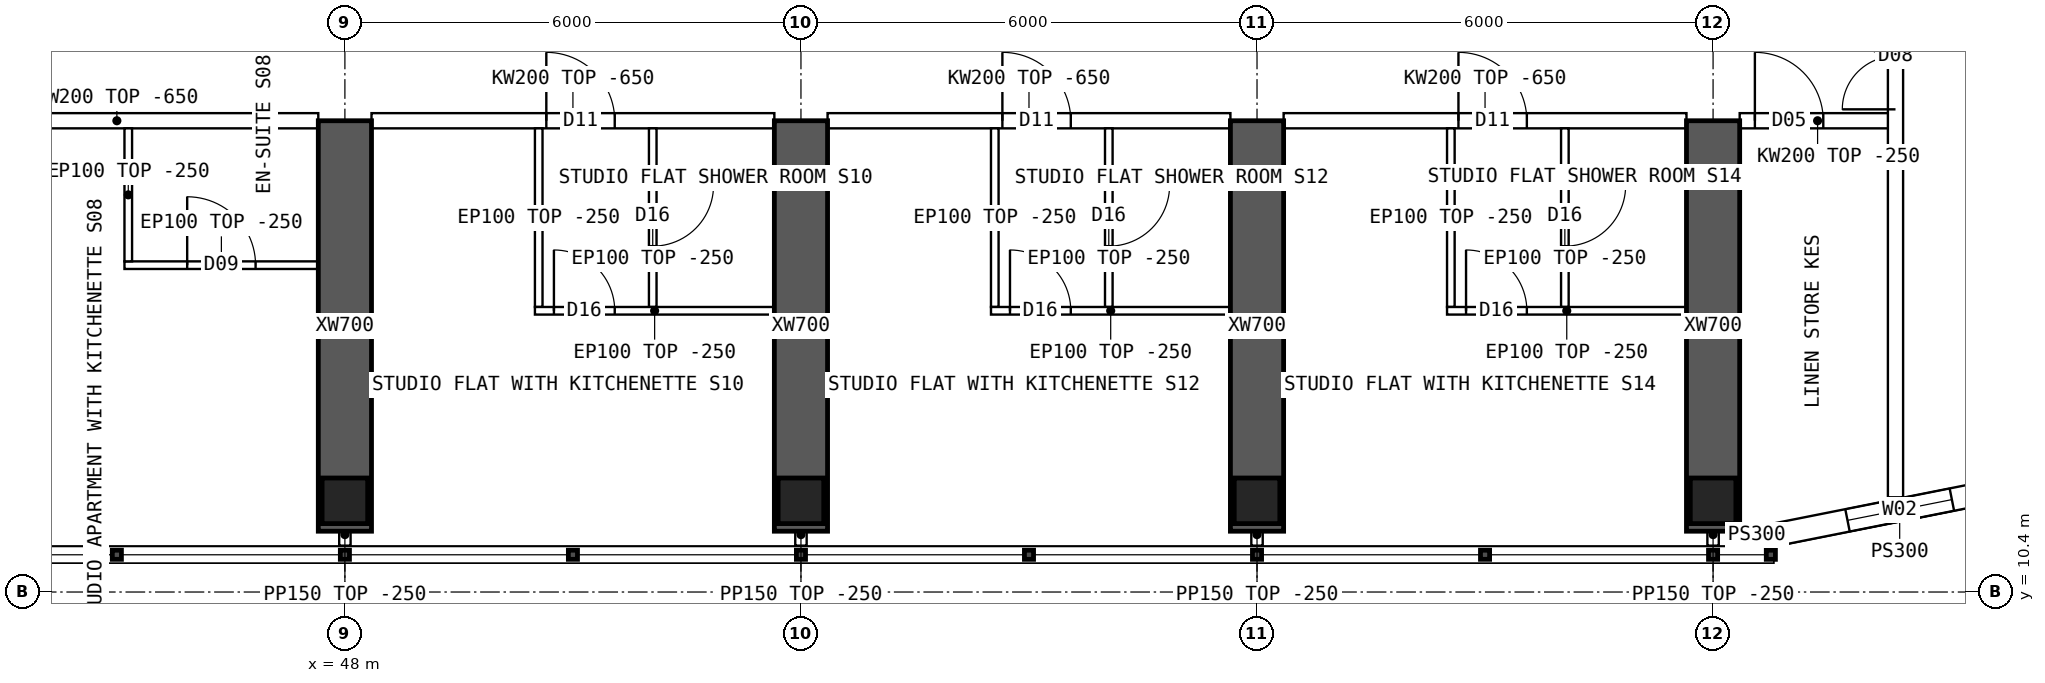
"""IFC4 building model, lengths in metres.
Left out: names, types, materials, properties, quantities, classifications, styles, units other than length and angle.
Written with IfcOpenShell. Run it as: python <this file> out.ifc"""

import sys

from ifc_helpers import new_model, si_unit, direction, frame, frame_2d, origin, origin_2d, place, context, subcontext, project, spatial, polyline, rectangle, hollow_rectangle, outline, extrude, element, fill, save


model = new_model("IFC4")
c1 = context("Model", 3, precision=1e-05, world=origin(), true_north=direction((0.0, 1.0)))
c2 = subcontext(c1, "Body", "Model", "MODEL_VIEW")
j1 = project(units=[si_unit("LENGTHUNIT", "METRE"), si_unit("PLANEANGLEUNIT", "RADIAN")], contexts=[c1])
p1 = place(None, origin())
s1 = spatial("IfcSite", under=j1, at=p1, CompositionType="ELEMENT")
p2 = place(p1, origin())
s2 = spatial("IfcBuilding", under=s1, at=p2, CompositionType="ELEMENT")
p3 = place(p2, frame((0.0, 0.0, 250.3)))
s3 = spatial("IfcBuildingStorey", under=s2, at=p3, CompositionType="ELEMENT", Elevation=250.3)
for number, where, z_axis, x_axis in (
    (1, (48.0, 11.6, 0.0), (0.0, 0.0, 1.0), (1.0, 0.0, 0.0)),
    (2, (54.0, 11.6, 0.0), (0.0, 0.0, 1.0), (1.0, 0.0, 0.0)),
    (3, (60.0, 11.6, 0.0), (0.0, 0.0, 1.0), (1.0, 0.0, 0.0)),
    (4, (66.0, 11.6, 0.0), (0.0, 0.0, 1.0), (1.0, 0.0, 0.0)),
):
    element("IfcColumn", number, at=place(p3, frame(where, z_axis=z_axis, x_axis=x_axis)), inside=s3, PredefinedType="COLUMN", context=c2, shape_type="SweptSolid", body=[
        extrude(hollow_rectangle(XDim=0.6, YDim=0.6, WallThickness=0.06, at=origin_2d()), origin(), (0.0, 0.0, 1.0), 3.75),
    ])
for number, where, z_axis, x_axis in (
    (5, (48.0, 11.2, 0.0), (0.0, 0.0, 1.0), (0.0, 1.0, 0.0)),
    (6, (54.0, 11.2, 0.0), (0.0, 0.0, 1.0), (0.0, 1.0, 0.0)),
    (7, (60.0, 11.2, 0.0), (0.0, 0.0, 1.0), (0.0, 1.0, 0.0)),
    (8, (66.0, 11.2, 0.0), (0.0, 0.0, 1.0), (0.0, 1.0, 0.0)),
):
    element("IfcWall", number, at=place(p3, frame(where, z_axis=z_axis, x_axis=x_axis)), inside=s3, PredefinedType="SHEAR", context=c2, shape_type="SweptSolid", body=[
        extrude(rectangle(XDim=5.4, YDim=0.7, at=frame_2d((2.7, 0.0))), origin(), (0.0, 0.0, 1.0), 3.75),
    ])
p4 = place(p3, frame((66.8, 11.15, 0.0), z_axis=(0.0, 0.0, 1.0), x_axis=(0.98078325777, 0.195100490205, 0.0)))
e9 = element("IfcWall", 9, at=p4, inside=s3, PredefinedType="SOLIDWALL", context=c2, shape_type="SweptSolid", body=[
    extrude(outline(polyline([(-0.03, -0.15), (3.405, -0.15), (3.345, 0.15), (0.03, 0.15), (-0.03, -0.15)])), origin(), (0.0, 0.0, 1.0), 3.5),
])
p5 = place(p4, frame((0.988, 0.0, 0.9)))
e10 = element("IfcOpeningElement", 10, at=p5, cuts=e9, PredefinedType="OPENING", context=c2, shape_type="SweptSolid", body=[
    extrude(rectangle(XDim=1.4, YDim=1.8, at=frame_2d((0.7, 0.9))), frame((0.0, 0.16, 0.0), z_axis=(0.0, -1.0, 0.0), x_axis=(1.0, 0.0, 0.0)), (0.0, 0.0, 1.0), 0.32),
])
p6 = place(p3, frame((66.8, 11.15, 0.0), z_axis=(0.0, 0.0, 1.0), x_axis=(-1.0, 0.0, 0.0)))
e11 = element("IfcWall", 11, at=p6, inside=s3, PredefinedType="SOLIDWALL", context=c2, shape_type="SweptSolid", body=[
    extrude(rectangle(XDim=0.45, YDim=0.3, at=frame_2d((0.225, 0.0))), origin(), (0.0, 0.0, 1.0), 3.5),
])
p7 = place(p3, frame((42.35, 16.6, 0.0), z_axis=(0.0, 0.0, 1.0), x_axis=(1.0, 0.0, 0.0)))
e12 = element("IfcWall", 12, at=p7, inside=s3, PredefinedType="SOLIDWALL", context=c2, shape_type="SweptSolid", body=[
    extrude(outline(polyline([(0.0, 0.0), (5.3, 0.0), (5.3, 3.1), (0.0, 3.1), (0.0, 0.0)])), frame((0.0, 0.1, 0.0), z_axis=(0.0, -1.0, 0.0), x_axis=(1.0, 0.0, 0.0)), (0.0, 0.0, 1.0), 0.2),
])
p8 = place(p7, frame((0.1, 0.0, 0.0)))
e13 = element("IfcOpeningElement", 13, at=p8, cuts=e12, PredefinedType="OPENING", context=c2, shape_type="SweptSolid", body=[
    extrude(rectangle(XDim=0.9, YDim=2.1, at=frame_2d((0.45, 1.05))), frame((0.0, 0.11, 0.0), z_axis=(0.0, -1.0, 0.0), x_axis=(1.0, 0.0, 0.0)), (0.0, 0.0, 1.0), 0.22),
])
p9 = place(p3, frame((48.35, 16.6, 0.0), z_axis=(0.0, 0.0, 1.0), x_axis=(1.0, 0.0, 0.0)))
e14 = element("IfcWall", 14, at=p9, inside=s3, PredefinedType="SOLIDWALL", context=c2, shape_type="SweptSolid", body=[
    extrude(outline(polyline([(0.0, 0.0), (5.3, 0.0), (5.3, 3.1), (0.0, 3.1), (0.0, 0.0)])), frame((0.0, 0.1, 0.0), z_axis=(0.0, -1.0, 0.0), x_axis=(1.0, 0.0, 0.0)), (0.0, 0.0, 1.0), 0.2),
])
p10 = place(p9, frame((2.3, 0.0, 0.0)))
e15 = element("IfcOpeningElement", 15, at=p10, cuts=e14, PredefinedType="OPENING", context=c2, shape_type="SweptSolid", body=[
    extrude(rectangle(XDim=0.9, YDim=2.1, at=frame_2d((0.45, 1.05))), frame((0.0, 0.11, 0.0), z_axis=(0.0, -1.0, 0.0), x_axis=(1.0, 0.0, 0.0)), (0.0, 0.0, 1.0), 0.22),
])
p11 = place(p3, frame((54.35, 16.6, 0.0), z_axis=(0.0, 0.0, 1.0), x_axis=(1.0, 0.0, 0.0)))
e16 = element("IfcWall", 16, at=p11, inside=s3, PredefinedType="SOLIDWALL", context=c2, shape_type="SweptSolid", body=[
    extrude(outline(polyline([(0.0, 0.0), (5.3, 0.0), (5.3, 3.1), (0.0, 3.1), (0.0, 0.0)])), frame((0.0, 0.1, 0.0), z_axis=(0.0, -1.0, 0.0), x_axis=(1.0, 0.0, 0.0)), (0.0, 0.0, 1.0), 0.2),
])
p12 = place(p11, frame((2.3, 0.0, 0.0)))
e17 = element("IfcOpeningElement", 17, at=p12, cuts=e16, PredefinedType="OPENING", context=c2, shape_type="SweptSolid", body=[
    extrude(rectangle(XDim=0.9, YDim=2.1, at=frame_2d((0.45, 1.05))), frame((0.0, 0.11, 0.0), z_axis=(0.0, -1.0, 0.0), x_axis=(1.0, 0.0, 0.0)), (0.0, 0.0, 1.0), 0.22),
])
p13 = place(p3, frame((60.35, 16.6, 0.0), z_axis=(0.0, 0.0, 1.0), x_axis=(1.0, 0.0, 0.0)))
e18 = element("IfcWall", 18, at=p13, inside=s3, PredefinedType="SOLIDWALL", context=c2, shape_type="SweptSolid", body=[
    extrude(outline(polyline([(0.0, 0.0), (5.3, 0.0), (5.3, 3.1), (0.0, 3.1), (0.0, 0.0)])), frame((0.0, 0.1, 0.0), z_axis=(0.0, -1.0, 0.0), x_axis=(1.0, 0.0, 0.0)), (0.0, 0.0, 1.0), 0.2),
])
p14 = place(p13, frame((2.3, 0.0, 0.0)))
e19 = element("IfcOpeningElement", 19, at=p14, cuts=e18, PredefinedType="OPENING", context=c2, shape_type="SweptSolid", body=[
    extrude(rectangle(XDim=0.9, YDim=2.1, at=frame_2d((0.45, 1.05))), frame((0.0, 0.11, 0.0), z_axis=(0.0, -1.0, 0.0), x_axis=(1.0, 0.0, 0.0)), (0.0, 0.0, 1.0), 0.22),
])
p15 = place(p3, frame((66.35, 16.6, 0.0), z_axis=(0.0, 0.0, 1.0), x_axis=(1.0, 0.0, 0.0)))
e20 = element("IfcWall", 20, at=p15, inside=s3, PredefinedType="SOLIDWALL", context=c2, shape_type="SweptSolid", body=[
    extrude(rectangle(XDim=2.05, YDim=0.2, at=frame_2d((1.025, 0.0))), origin(), (0.0, 0.0, 1.0), 3.5),
])
p16 = place(p15, frame((0.2, 0.0, 0.0)))
e21 = element("IfcOpeningElement", 21, at=p16, cuts=e20, PredefinedType="OPENING", context=c2, shape_type="SweptSolid", body=[
    extrude(rectangle(XDim=0.9, YDim=2.1, at=frame_2d((0.45, 1.05))), frame((0.0, 0.11, 0.0), z_axis=(0.0, -1.0, 0.0), x_axis=(1.0, 0.0, 0.0)), (0.0, 0.0, 1.0), 0.22),
])
p17 = place(p3, frame((47.65, 14.7, 0.0), z_axis=(0.0, 0.0, 1.0), x_axis=(-1.0, 0.0, 0.0)))
e22 = element("IfcWall", 22, at=p17, inside=s3, PredefinedType="PARTITIONING", context=c2, shape_type="SweptSolid", body=[
    extrude(rectangle(XDim=2.55, YDim=0.1, at=frame_2d((1.275, 0.0))), origin(), (0.0, 0.0, 1.0), 3.5),
])
p18 = place(p17, frame((0.825, 0.0, 0.0)))
e23 = element("IfcOpeningElement", 23, at=p18, cuts=e22, PredefinedType="OPENING", context=c2, shape_type="SweptSolid", body=[
    extrude(rectangle(XDim=0.9, YDim=2.1, at=frame_2d((0.45, 1.05))), frame((0.0, 0.06, 0.0), z_axis=(0.0, -1.0, 0.0), x_axis=(1.0, 0.0, 0.0)), (0.0, 0.0, 1.0), 0.12),
])
p19 = place(p3, frame((45.15, 14.75, 0.0), z_axis=(0.0, 0.0, 1.0), x_axis=(0.0, 1.0, 0.0)))
e24 = element("IfcWall", 24, at=p19, inside=s3, PredefinedType="PARTITIONING", context=c2, shape_type="SweptSolid", body=[
    extrude(outline(polyline([(0.0, 0.0), (1.75, 0.0), (1.75, 3.1), (1.702, 3.1), (1.7, 3.5), (0.0, 3.5), (0.0, 0.0)])), frame((0.0, 0.05, 0.0), z_axis=(0.0, -1.0, 0.0), x_axis=(1.0, 0.0, 0.0)), (0.0, 0.0, 1.0), 0.1),
])
p20 = place(p3, frame((53.65, 14.1, 0.0), z_axis=(0.0, 0.0, 1.0), x_axis=(-1.0, 0.0, 0.0)))
e25 = element("IfcWall", 25, at=p20, inside=s3, PredefinedType="PARTITIONING", context=c2, shape_type="SweptSolid", body=[
    extrude(rectangle(XDim=3.15, YDim=0.1, at=frame_2d((1.575, 0.0))), origin(), (0.0, 0.0, 1.0), 3.5),
])
p21 = place(p20, frame((2.1, 0.0, 0.0)))
e26 = element("IfcOpeningElement", 26, at=p21, cuts=e25, PredefinedType="OPENING", context=c2, shape_type="SweptSolid", body=[
    extrude(rectangle(XDim=0.8, YDim=2.1, at=frame_2d((0.4, 1.05))), frame((0.0, 0.06, 0.0), z_axis=(0.0, -1.0, 0.0), x_axis=(1.0, 0.0, 0.0)), (0.0, 0.0, 1.0), 0.12),
])
p22 = place(p3, frame((50.55, 14.15, 0.0), z_axis=(0.0, 0.0, 1.0), x_axis=(0.0, 1.0, 0.0)))
e27 = element("IfcWall", 27, at=p22, inside=s3, PredefinedType="PARTITIONING", context=c2, shape_type="SweptSolid", body=[
    extrude(outline(polyline([(0.0, 0.0), (2.35, 0.0), (2.35, 3.1), (2.302, 3.1), (2.3, 3.5), (0.0, 3.5), (0.0, 0.0)])), frame((0.0, 0.05, 0.0), z_axis=(0.0, -1.0, 0.0), x_axis=(1.0, 0.0, 0.0)), (0.0, 0.0, 1.0), 0.1),
])
p23 = place(p3, frame((52.05, 14.15, 0.0), z_axis=(0.0, 0.0, 1.0), x_axis=(0.0, 1.0, 0.0)))
e28 = element("IfcWall", 28, at=p23, inside=s3, PredefinedType="PARTITIONING", context=c2, shape_type="SweptSolid", body=[
    extrude(outline(polyline([(0.0, 0.0), (2.35, 0.0), (2.35, 3.1), (2.302, 3.1), (2.3, 3.5), (0.0, 3.5), (0.0, 0.0)])), frame((0.0, 0.05, 0.0), z_axis=(0.0, -1.0, 0.0), x_axis=(1.0, 0.0, 0.0)), (0.0, 0.0, 1.0), 0.1),
])
p24 = place(p23, frame((0.8, 0.0, 0.0)))
e29 = element("IfcOpeningElement", 29, at=p24, cuts=e28, PredefinedType="OPENING", context=c2, shape_type="SweptSolid", body=[
    extrude(rectangle(XDim=0.8, YDim=2.1, at=frame_2d((0.4, 1.05))), frame((0.0, 0.06, 0.0), z_axis=(0.0, -1.0, 0.0), x_axis=(1.0, 0.0, 0.0)), (0.0, 0.0, 1.0), 0.12),
])
p25 = place(p3, frame((59.65, 14.1, 0.0), z_axis=(0.0, 0.0, 1.0), x_axis=(-1.0, 0.0, 0.0)))
e30 = element("IfcWall", 30, at=p25, inside=s3, PredefinedType="PARTITIONING", context=c2, shape_type="SweptSolid", body=[
    extrude(rectangle(XDim=3.15, YDim=0.1, at=frame_2d((1.575, 0.0))), origin(), (0.0, 0.0, 1.0), 3.5),
])
p26 = place(p25, frame((2.1, 0.0, 0.0)))
e31 = element("IfcOpeningElement", 31, at=p26, cuts=e30, PredefinedType="OPENING", context=c2, shape_type="SweptSolid", body=[
    extrude(rectangle(XDim=0.8, YDim=2.1, at=frame_2d((0.4, 1.05))), frame((0.0, 0.06, 0.0), z_axis=(0.0, -1.0, 0.0), x_axis=(1.0, 0.0, 0.0)), (0.0, 0.0, 1.0), 0.12),
])
p27 = place(p3, frame((56.55, 14.15, 0.0), z_axis=(0.0, 0.0, 1.0), x_axis=(0.0, 1.0, 0.0)))
e32 = element("IfcWall", 32, at=p27, inside=s3, PredefinedType="PARTITIONING", context=c2, shape_type="SweptSolid", body=[
    extrude(outline(polyline([(0.0, 0.0), (2.35, 0.0), (2.35, 3.1), (2.302, 3.1), (2.3, 3.5), (0.0, 3.5), (0.0, 0.0)])), frame((0.0, 0.05, 0.0), z_axis=(0.0, -1.0, 0.0), x_axis=(1.0, 0.0, 0.0)), (0.0, 0.0, 1.0), 0.1),
])
p28 = place(p3, frame((58.05, 14.15, 0.0), z_axis=(0.0, 0.0, 1.0), x_axis=(0.0, 1.0, 0.0)))
e33 = element("IfcWall", 33, at=p28, inside=s3, PredefinedType="PARTITIONING", context=c2, shape_type="SweptSolid", body=[
    extrude(outline(polyline([(0.0, 0.0), (2.35, 0.0), (2.35, 3.1), (2.302, 3.1), (2.3, 3.5), (0.0, 3.5), (0.0, 0.0)])), frame((0.0, 0.05, 0.0), z_axis=(0.0, -1.0, 0.0), x_axis=(1.0, 0.0, 0.0)), (0.0, 0.0, 1.0), 0.1),
])
p29 = place(p28, frame((0.8, 0.0, 0.0)))
e34 = element("IfcOpeningElement", 34, at=p29, cuts=e33, PredefinedType="OPENING", context=c2, shape_type="SweptSolid", body=[
    extrude(rectangle(XDim=0.8, YDim=2.1, at=frame_2d((0.4, 1.05))), frame((0.0, 0.06, 0.0), z_axis=(0.0, -1.0, 0.0), x_axis=(1.0, 0.0, 0.0)), (0.0, 0.0, 1.0), 0.12),
])
p30 = place(p3, frame((65.65, 14.1, 0.0), z_axis=(0.0, 0.0, 1.0), x_axis=(-1.0, 0.0, 0.0)))
e35 = element("IfcWall", 35, at=p30, inside=s3, PredefinedType="PARTITIONING", context=c2, shape_type="SweptSolid", body=[
    extrude(rectangle(XDim=3.15, YDim=0.1, at=frame_2d((1.575, 0.0))), origin(), (0.0, 0.0, 1.0), 3.5),
])
p31 = place(p30, frame((2.1, 0.0, 0.0)))
e36 = element("IfcOpeningElement", 36, at=p31, cuts=e35, PredefinedType="OPENING", context=c2, shape_type="SweptSolid", body=[
    extrude(rectangle(XDim=0.8, YDim=2.1, at=frame_2d((0.4, 1.05))), frame((0.0, 0.06, 0.0), z_axis=(0.0, -1.0, 0.0), x_axis=(1.0, 0.0, 0.0)), (0.0, 0.0, 1.0), 0.12),
])
p32 = place(p3, frame((62.55, 14.15, 0.0), z_axis=(0.0, 0.0, 1.0), x_axis=(0.0, 1.0, 0.0)))
e37 = element("IfcWall", 37, at=p32, inside=s3, PredefinedType="PARTITIONING", context=c2, shape_type="SweptSolid", body=[
    extrude(outline(polyline([(0.0, 0.0), (2.35, 0.0), (2.35, 3.1), (2.302, 3.1), (2.3, 3.5), (0.0, 3.5), (0.0, 0.0)])), frame((0.0, 0.05, 0.0), z_axis=(0.0, -1.0, 0.0), x_axis=(1.0, 0.0, 0.0)), (0.0, 0.0, 1.0), 0.1),
])
p33 = place(p3, frame((64.05, 14.15, 0.0), z_axis=(0.0, 0.0, 1.0), x_axis=(0.0, 1.0, 0.0)))
e38 = element("IfcWall", 38, at=p33, inside=s3, PredefinedType="PARTITIONING", context=c2, shape_type="SweptSolid", body=[
    extrude(outline(polyline([(0.0, 0.0), (2.35, 0.0), (2.35, 3.1), (2.302, 3.1), (2.3, 3.5), (0.0, 3.5), (0.0, 0.0)])), frame((0.0, 0.05, 0.0), z_axis=(0.0, -1.0, 0.0), x_axis=(1.0, 0.0, 0.0)), (0.0, 0.0, 1.0), 0.1),
])
p34 = place(p33, frame((0.8, 0.0, 0.0)))
e39 = element("IfcOpeningElement", 39, at=p34, cuts=e38, PredefinedType="OPENING", context=c2, shape_type="SweptSolid", body=[
    extrude(rectangle(XDim=0.8, YDim=2.1, at=frame_2d((0.4, 1.05))), frame((0.0, 0.06, 0.0), z_axis=(0.0, -1.0, 0.0), x_axis=(1.0, 0.0, 0.0)), (0.0, 0.0, 1.0), 0.12),
])
p35 = place(p3, frame((68.4, 11.646, 0.0), z_axis=(0.0, 0.0, 1.0), x_axis=(0.0, 1.0, 0.0)))
e40 = element("IfcWall", 40, at=p35, inside=s3, PredefinedType="SOLIDWALL", context=c2, shape_type="SweptSolid", body=[
    extrude(rectangle(XDim=40.708, YDim=0.2, at=frame_2d((20.354, 0.0))), origin(), (0.0, 0.0, 1.0), 3.5),
])
p36 = place(p35, frame((5.104, 0.0, 0.0)))
e41 = element("IfcOpeningElement", 41, at=p36, cuts=e40, PredefinedType="OPENING", context=c2, shape_type="SweptSolid", body=[
    extrude(rectangle(XDim=1.4, YDim=2.1, at=frame_2d((0.7, 1.05))), frame((0.0, 0.11, 0.0), z_axis=(0.0, -1.0, 0.0), x_axis=(1.0, 0.0, 0.0)), (0.0, 0.0, 1.0), 0.22),
])
p37 = place(p35, frame((34.104, 0.0, 0.0)))
e42 = element("IfcOpeningElement", 42, at=p37, cuts=e40, PredefinedType="OPENING", context=c2, shape_type="SweptSolid", body=[
    extrude(rectangle(XDim=1.4, YDim=2.1, at=frame_2d((0.7, 1.05))), frame((0.0, 0.11, 0.0), z_axis=(0.0, -1.0, 0.0), x_axis=(1.0, 0.0, 0.0)), (0.0, 0.0, 1.0), 0.22),
])
for number, where, z_axis, x_axis in (
    (43, (48.0, 11.3, 0.0), (0.0, 0.0, 1.0), (0.0, -1.0, 0.0)),
    (44, (54.0, 11.3, 0.0), (0.0, 0.0, 1.0), (0.0, -1.0, 0.0)),
    (45, (60.0, 11.3, 0.0), (0.0, 0.0, 1.0), (0.0, -1.0, 0.0)),
    (46, (66.0, 11.3, 0.0), (0.0, 0.0, 1.0), (0.0, -1.0, 0.0)),
):
    element("IfcWall", number, at=place(p3, frame(where, z_axis=z_axis, x_axis=x_axis)), inside=s3, PredefinedType="PARTITIONING", context=c2, shape_type="SweptSolid", body=[
        extrude(rectangle(XDim=0.29, YDim=0.15, at=frame_2d((0.145, 0.0))), origin(), (0.0, 0.0, 1.0), 3.5),
    ])
p38 = place(p5, origin())
e47 = element("IfcWindow", 47, at=p38, inside=s3, PartitioningType="SINGLE_PANEL", PredefinedType="WINDOW", context=c2, shape_type="SweptSolid", body=[
    extrude(rectangle(XDim=1.4, YDim=1.8, at=frame_2d((0.7, 0.9))), frame((0.0, 0.03, 0.0), z_axis=(0.0, -1.0, 0.0), x_axis=(1.0, 0.0, 0.0)), (0.0, 0.0, 1.0), 0.06),
])
fill(e10, e47)
p39 = place(p18, origin())
e48 = element("IfcDoor", 48, at=p39, inside=s3, OperationType="SINGLE_SWING_RIGHT", PredefinedType="DOOR", context=c2, shape_type="SweptSolid", body=[
    extrude(rectangle(XDim=0.9, YDim=2.1, at=frame_2d((0.45, 1.05))), frame((0.0, 0.025, 0.0), z_axis=(0.0, -1.0, 0.0), x_axis=(1.0, 0.0, 0.0)), (0.0, 0.0, 1.0), 0.05),
])
fill(e23, e48)
p40 = place(p21, origin())
e49 = element("IfcDoor", 49, at=p40, inside=s3, OperationType="SINGLE_SWING_RIGHT", PredefinedType="DOOR", context=c2, shape_type="SweptSolid", body=[
    extrude(rectangle(XDim=0.8, YDim=2.1, at=frame_2d((0.4, 1.05))), frame((0.0, 0.025, 0.0), z_axis=(0.0, -1.0, 0.0), x_axis=(1.0, 0.0, 0.0)), (0.0, 0.0, 1.0), 0.05),
])
fill(e26, e49)
p41 = place(p24, origin())
e50 = element("IfcDoor", 50, at=p41, inside=s3, OperationType="SINGLE_SWING_RIGHT", PredefinedType="DOOR", context=c2, shape_type="SweptSolid", body=[
    extrude(rectangle(XDim=0.8, YDim=2.1, at=frame_2d((0.4, 1.05))), frame((0.0, 0.025, 0.0), z_axis=(0.0, -1.0, 0.0), x_axis=(1.0, 0.0, 0.0)), (0.0, 0.0, 1.0), 0.05),
])
fill(e29, e50)
p42 = place(p10, origin())
e51 = element("IfcDoor", 51, at=p42, inside=s3, OperationType="SINGLE_SWING_LEFT", PredefinedType="DOOR", context=c2, shape_type="SweptSolid", body=[
    extrude(rectangle(XDim=0.9, YDim=2.1, at=frame_2d((0.45, 1.05))), frame((0.0, 0.025, 0.0), z_axis=(0.0, -1.0, 0.0), x_axis=(1.0, 0.0, 0.0)), (0.0, 0.0, 1.0), 0.05),
])
fill(e15, e51)
p43 = place(p26, origin())
e52 = element("IfcDoor", 52, at=p43, inside=s3, OperationType="SINGLE_SWING_RIGHT", PredefinedType="DOOR", context=c2, shape_type="SweptSolid", body=[
    extrude(rectangle(XDim=0.8, YDim=2.1, at=frame_2d((0.4, 1.05))), frame((0.0, 0.025, 0.0), z_axis=(0.0, -1.0, 0.0), x_axis=(1.0, 0.0, 0.0)), (0.0, 0.0, 1.0), 0.05),
])
fill(e31, e52)
p44 = place(p29, origin())
e53 = element("IfcDoor", 53, at=p44, inside=s3, OperationType="SINGLE_SWING_RIGHT", PredefinedType="DOOR", context=c2, shape_type="SweptSolid", body=[
    extrude(rectangle(XDim=0.8, YDim=2.1, at=frame_2d((0.4, 1.05))), frame((0.0, 0.025, 0.0), z_axis=(0.0, -1.0, 0.0), x_axis=(1.0, 0.0, 0.0)), (0.0, 0.0, 1.0), 0.05),
])
fill(e34, e53)
p45 = place(p12, origin())
e54 = element("IfcDoor", 54, at=p45, inside=s3, OperationType="SINGLE_SWING_LEFT", PredefinedType="DOOR", context=c2, shape_type="SweptSolid", body=[
    extrude(rectangle(XDim=0.9, YDim=2.1, at=frame_2d((0.45, 1.05))), frame((0.0, 0.025, 0.0), z_axis=(0.0, -1.0, 0.0), x_axis=(1.0, 0.0, 0.0)), (0.0, 0.0, 1.0), 0.05),
])
fill(e17, e54)
p46 = place(p31, origin())
e55 = element("IfcDoor", 55, at=p46, inside=s3, OperationType="SINGLE_SWING_RIGHT", PredefinedType="DOOR", context=c2, shape_type="SweptSolid", body=[
    extrude(rectangle(XDim=0.8, YDim=2.1, at=frame_2d((0.4, 1.05))), frame((0.0, 0.025, 0.0), z_axis=(0.0, -1.0, 0.0), x_axis=(1.0, 0.0, 0.0)), (0.0, 0.0, 1.0), 0.05),
])
fill(e36, e55)
p47 = place(p34, origin())
e56 = element("IfcDoor", 56, at=p47, inside=s3, OperationType="SINGLE_SWING_RIGHT", PredefinedType="DOOR", context=c2, shape_type="SweptSolid", body=[
    extrude(rectangle(XDim=0.8, YDim=2.1, at=frame_2d((0.4, 1.05))), frame((0.0, 0.025, 0.0), z_axis=(0.0, -1.0, 0.0), x_axis=(1.0, 0.0, 0.0)), (0.0, 0.0, 1.0), 0.05),
])
fill(e39, e56)
p48 = place(p14, origin())
e57 = element("IfcDoor", 57, at=p48, inside=s3, OperationType="SINGLE_SWING_LEFT", PredefinedType="DOOR", context=c2, shape_type="SweptSolid", body=[
    extrude(rectangle(XDim=0.9, YDim=2.1, at=frame_2d((0.45, 1.05))), frame((0.0, 0.025, 0.0), z_axis=(0.0, -1.0, 0.0), x_axis=(1.0, 0.0, 0.0)), (0.0, 0.0, 1.0), 0.05),
])
fill(e19, e57)
p49 = place(p36, origin())
e58 = element("IfcDoor", 58, at=p49, inside=s3, OperationType="DOUBLE_DOOR_SINGLE_SWING", PredefinedType="DOOR", context=c2, shape_type="SweptSolid", body=[
    extrude(rectangle(XDim=1.4, YDim=2.1, at=frame_2d((0.7, 1.05))), frame((0.0, 0.025, 0.0), z_axis=(0.0, -1.0, 0.0), x_axis=(1.0, 0.0, 0.0)), (0.0, 0.0, 1.0), 0.05),
])
fill(e41, e58)
p50 = place(p16, origin())
e59 = element("IfcDoor", 59, at=p50, inside=s3, OperationType="SINGLE_SWING_LEFT", PredefinedType="DOOR", context=c2, shape_type="SweptSolid", body=[
    extrude(rectangle(XDim=0.9, YDim=2.1, at=frame_2d((0.45, 1.05))), frame((0.0, 0.025, 0.0), z_axis=(0.0, -1.0, 0.0), x_axis=(1.0, 0.0, 0.0)), (0.0, 0.0, 1.0), 0.05),
])
fill(e21, e59)
save(model, sys.argv[1])
